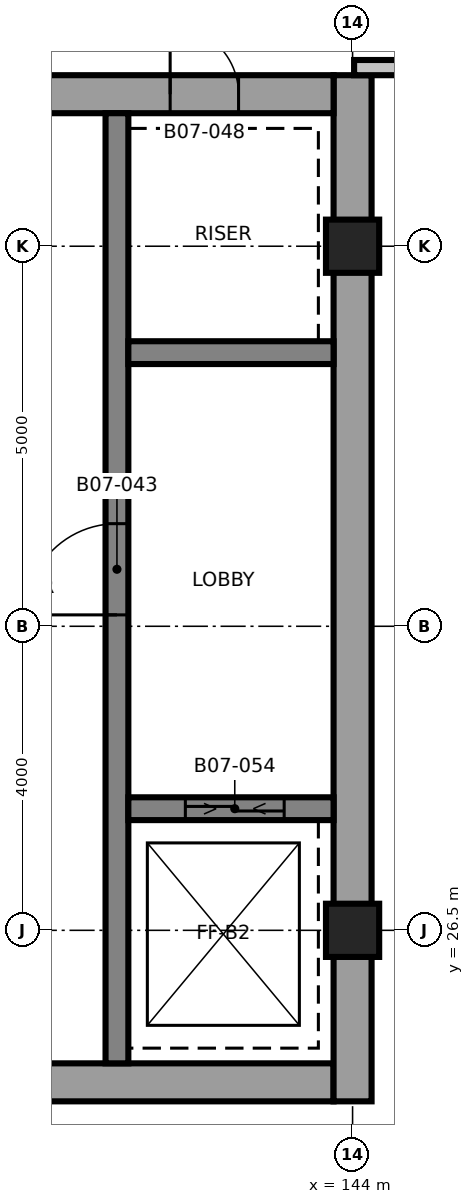
"""IFC4 building model, lengths in metres.
Left out: names, types, materials, properties, quantities, classifications, styles, units other than length and angle.
Written with IfcOpenShell. Run it as: python <this file> out.ifc"""

import sys

from ifc_helpers import new_model, si_unit, direction, frame, frame_2d, origin, origin_2d, place, context, subcontext, project, spatial, rectangle, extrude, element, fill, save


model = new_model("IFC4")
c1 = context("Model", 3, precision=1e-05, world=origin(), true_north=direction((0.0, 1.0)))
c2 = subcontext(c1, "Body", "Model", "MODEL_VIEW")
j1 = project(units=[si_unit("LENGTHUNIT", "METRE"), si_unit("PLANEANGLEUNIT", "RADIAN")], contexts=[c1])
p1 = place(None, origin())
s1 = spatial("IfcSite", under=j1, at=p1, CompositionType="ELEMENT")
p2 = place(p1, origin())
s2 = spatial("IfcBuilding", under=s1, at=p2, CompositionType="ELEMENT")
p3 = place(p2, frame((0.0, 0.0, 87.1)))
s3 = spatial("IfcBuildingStorey", under=s2, at=p3, CompositionType="ELEMENT", Elevation=87.1)
p4 = place(p3, frame((128.75, 24.5, 0.0), z_axis=(0.0, 0.0, 1.0), x_axis=(1.0, 0.0, 0.0)))
e1 = element("IfcWall", 1, at=p4, inside=s3, PredefinedType="SHEAR", context=c2, shape_type="SweptSolid", body=[
    extrude(rectangle(XDim=15.0, YDim=0.5, at=frame_2d((7.5, 0.0))), origin(), (0.0, 0.0, 1.0), 3.7),
])
p5 = place(p4, frame((9.65, 0.0, 0.0)))
e2 = element("IfcOpeningElement", 2, at=p5, cuts=e1, PredefinedType="OPENING", context=c2, shape_type="SweptSolid", body=[
    extrude(rectangle(XDim=1.5, YDim=2.1, at=frame_2d((0.75, 1.05))), frame((0.0, 0.26, 0.0), z_axis=(0.0, -1.0, 0.0), x_axis=(1.0, 0.0, 0.0)), (0.0, 0.0, 1.0), 0.52),
])
p6 = place(p4, frame((1.25, 0.0, 0.0)))
e3 = element("IfcOpeningElement", 3, at=p6, cuts=e1, PredefinedType="OPENING", context=c2, shape_type="SweptSolid", body=[
    extrude(rectangle(XDim=0.9, YDim=2.1, at=frame_2d((0.45, 1.05))), frame((0.0, 0.26, 0.0), z_axis=(0.0, -1.0, 0.0), x_axis=(1.0, 0.0, 0.0)), (0.0, 0.0, 1.0), 0.52),
])
p7 = place(p3, frame((144.0, 24.25, 0.0), z_axis=(0.0, 0.0, 1.0), x_axis=(0.0, 1.0, 0.0)))
e4 = element("IfcWall", 4, at=p7, inside=s3, PredefinedType="SHEAR", context=c2, shape_type="SweptSolid", body=[
    extrude(rectangle(XDim=13.5, YDim=0.5, at=frame_2d((6.75, 0.0))), origin(), (0.0, 0.0, 1.0), 3.7),
])
p8 = place(p3, frame((128.75, 37.5, 0.0), z_axis=(0.0, 0.0, 1.0), x_axis=(1.0, 0.0, 0.0)))
e5 = element("IfcWall", 5, at=p8, inside=s3, PredefinedType="SHEAR", context=c2, shape_type="SweptSolid", body=[
    extrude(rectangle(XDim=15.0, YDim=0.5, at=frame_2d((7.5, 0.0))), origin(), (0.0, 0.0, 1.0), 3.7),
])
p9 = place(p8, frame((9.65, 0.0, 0.0)))
e6 = element("IfcOpeningElement", 6, at=p9, cuts=e5, PredefinedType="OPENING", context=c2, shape_type="SweptSolid", body=[
    extrude(rectangle(XDim=1.5, YDim=2.1, at=frame_2d((0.75, 1.05))), frame((0.0, 0.26, 0.0), z_axis=(0.0, -1.0, 0.0), x_axis=(1.0, 0.0, 0.0)), (0.0, 0.0, 1.0), 0.52),
])
p10 = place(p8, frame((12.85, 0.0, 0.0)))
e7 = element("IfcOpeningElement", 7, at=p10, cuts=e5, PredefinedType="OPENING", context=c2, shape_type="SweptSolid", body=[
    extrude(rectangle(XDim=0.9, YDim=2.1, at=frame_2d((0.45, 1.05))), frame((0.0, 0.26, 0.0), z_axis=(0.0, -1.0, 0.0), x_axis=(1.0, 0.0, 0.0)), (0.0, 0.0, 1.0), 0.52),
])
p11 = place(p8, frame((3.8, 0.0, 0.0)))
e8 = element("IfcOpeningElement", 8, at=p11, cuts=e5, PredefinedType="OPENING", context=c2, shape_type="SweptSolid", body=[
    extrude(rectangle(XDim=0.9, YDim=2.1, at=frame_2d((0.45, 1.05))), frame((0.0, 0.26, 0.0), z_axis=(0.0, -1.0, 0.0), x_axis=(1.0, 0.0, 0.0)), (0.0, 0.0, 1.0), 0.52),
])
p12 = place(p8, frame((6.7, 0.0, 0.0)))
e9 = element("IfcOpeningElement", 9, at=p12, cuts=e5, PredefinedType="OPENING", context=c2, shape_type="SweptSolid", body=[
    extrude(rectangle(XDim=0.9, YDim=2.1, at=frame_2d((0.45, 1.05))), frame((0.0, 0.26, 0.0), z_axis=(0.0, -1.0, 0.0), x_axis=(1.0, 0.0, 0.0)), (0.0, 0.0, 1.0), 0.52),
])
p13 = place(p3, frame((140.9, 24.75, 0.0), z_axis=(0.0, 0.0, 1.0), x_axis=(0.0, 1.0, 0.0)))
e10 = element("IfcWall", 10, at=p13, inside=s3, PredefinedType="SHEAR", context=c2, shape_type="SweptSolid", body=[
    extrude(rectangle(XDim=12.5, YDim=0.3, at=frame_2d((6.25, 0.0))), origin(), (0.0, 0.0, 1.0), 3.7),
])
p14 = place(p13, frame((5.9, 0.0, 0.0)))
e11 = element("IfcOpeningElement", 11, at=p14, cuts=e10, PredefinedType="OPENING", context=c2, shape_type="SweptSolid", body=[
    extrude(rectangle(XDim=1.2, YDim=2.1, at=frame_2d((0.6, 1.05))), frame((0.0, 0.16, 0.0), z_axis=(0.0, -1.0, 0.0), x_axis=(1.0, 0.0, 0.0)), (0.0, 0.0, 1.0), 0.32),
])
p15 = place(p3, frame((141.05, 28.1, 0.0), z_axis=(0.0, 0.0, 1.0), x_axis=(1.0, 0.0, 0.0)))
e12 = element("IfcWall", 12, at=p15, inside=s3, PredefinedType="SHEAR", context=c2, shape_type="SweptSolid", body=[
    extrude(rectangle(XDim=2.7, YDim=0.3, at=frame_2d((1.35, 0.0))), origin(), (0.0, 0.0, 1.0), 3.7),
])
p16 = place(p15, frame((0.75, 0.0, 0.0)))
e13 = element("IfcOpeningElement", 13, at=p16, cuts=e12, PredefinedType="OPENING", context=c2, shape_type="SweptSolid", body=[
    extrude(rectangle(XDim=1.3, YDim=2.4, at=frame_2d((0.65, 1.2))), frame((0.0, 0.16, 0.0), z_axis=(0.0, -1.0, 0.0), x_axis=(1.0, 0.0, 0.0)), (0.0, 0.0, 1.0), 0.32),
])
p17 = place(p3, frame((141.05, 34.1, 0.0), z_axis=(0.0, 0.0, 1.0), x_axis=(1.0, 0.0, 0.0)))
e14 = element("IfcWall", 14, at=p17, inside=s3, PredefinedType="SHEAR", context=c2, shape_type="SweptSolid", body=[
    extrude(rectangle(XDim=2.7, YDim=0.3, at=frame_2d((1.35, 0.0))), origin(), (0.0, 0.0, 1.0), 3.7),
])
for number, where, z_axis, x_axis in (
    (15, (144.0, 26.5, 0.0), (0.0, 0.0, 1.0), (1.0, 0.0, 0.0)),
    (16, (144.0, 35.5, 0.0), (0.0, 0.0, 1.0), (1.0, 0.0, 0.0)),
):
    element("IfcColumn", number, at=place(p3, frame(where, z_axis=z_axis, x_axis=x_axis)), inside=s3, PredefinedType="COLUMN", context=c2, shape_type="SweptSolid", body=[
        extrude(rectangle(XDim=0.7, YDim=0.7, at=origin_2d()), origin(), (0.0, 0.0, 1.0), 3.7),
    ])
p18 = place(p3, frame((144.02, 37.85, 0.0), z_axis=(0.0, 0.0, 1.0), x_axis=(1.0, 0.0, 0.0)))
e17 = element("IfcWall", 17, at=p18, inside=s3, PredefinedType="PARTITIONING", context=c2, shape_type="SweptSolid", body=[
    extrude(rectangle(XDim=3.23, YDim=0.2, at=frame_2d((1.615, 0.0))), origin(), (0.0, 0.0, 1.0), 3.4),
])
p19 = place(p18, frame((1.03, 0.0, 0.0)))
e18 = element("IfcOpeningElement", 18, at=p19, cuts=e17, PredefinedType="OPENING", context=c2, shape_type="SweptSolid", body=[
    extrude(rectangle(XDim=1.5, YDim=2.1, at=frame_2d((0.75, 1.05))), frame((0.0, 0.11, 0.0), z_axis=(0.0, -1.0, 0.0), x_axis=(1.0, 0.0, 0.0)), (0.0, 0.0, 1.0), 0.22),
])
p20 = place(p14, origin())
e19 = element("IfcDoor", 19, at=p20, inside=s3, OperationType="SINGLE_SWING_RIGHT", PredefinedType="DOOR", context=c2, shape_type="SweptSolid", body=[
    extrude(rectangle(XDim=1.2, YDim=2.1, at=frame_2d((0.6, 1.05))), frame((0.0, 0.025, 0.0), z_axis=(0.0, -1.0, 0.0), x_axis=(1.0, 0.0, 0.0)), (0.0, 0.0, 1.0), 0.05),
])
fill(e11, e19)
p21 = place(p10, origin())
e20 = element("IfcDoor", 20, at=p21, inside=s3, OperationType="SINGLE_SWING_RIGHT", PredefinedType="DOOR", context=c2, shape_type="SweptSolid", body=[
    extrude(rectangle(XDim=0.9, YDim=2.1, at=frame_2d((0.45, 1.05))), frame((0.0, 0.025, 0.0), z_axis=(0.0, -1.0, 0.0), x_axis=(1.0, 0.0, 0.0)), (0.0, 0.0, 1.0), 0.05),
])
fill(e7, e20)
p22 = place(p16, origin())
e21 = element("IfcDoor", 21, at=p22, inside=s3, OperationType="SLIDING_TO_LEFT", PredefinedType="DOOR", context=c2, shape_type="SweptSolid", body=[
    extrude(rectangle(XDim=1.3, YDim=2.4, at=frame_2d((0.65, 1.2))), frame((0.0, 0.025, 0.0), z_axis=(0.0, -1.0, 0.0), x_axis=(1.0, 0.0, 0.0)), (0.0, 0.0, 1.0), 0.05),
])
fill(e13, e21)
save(model, sys.argv[1])
